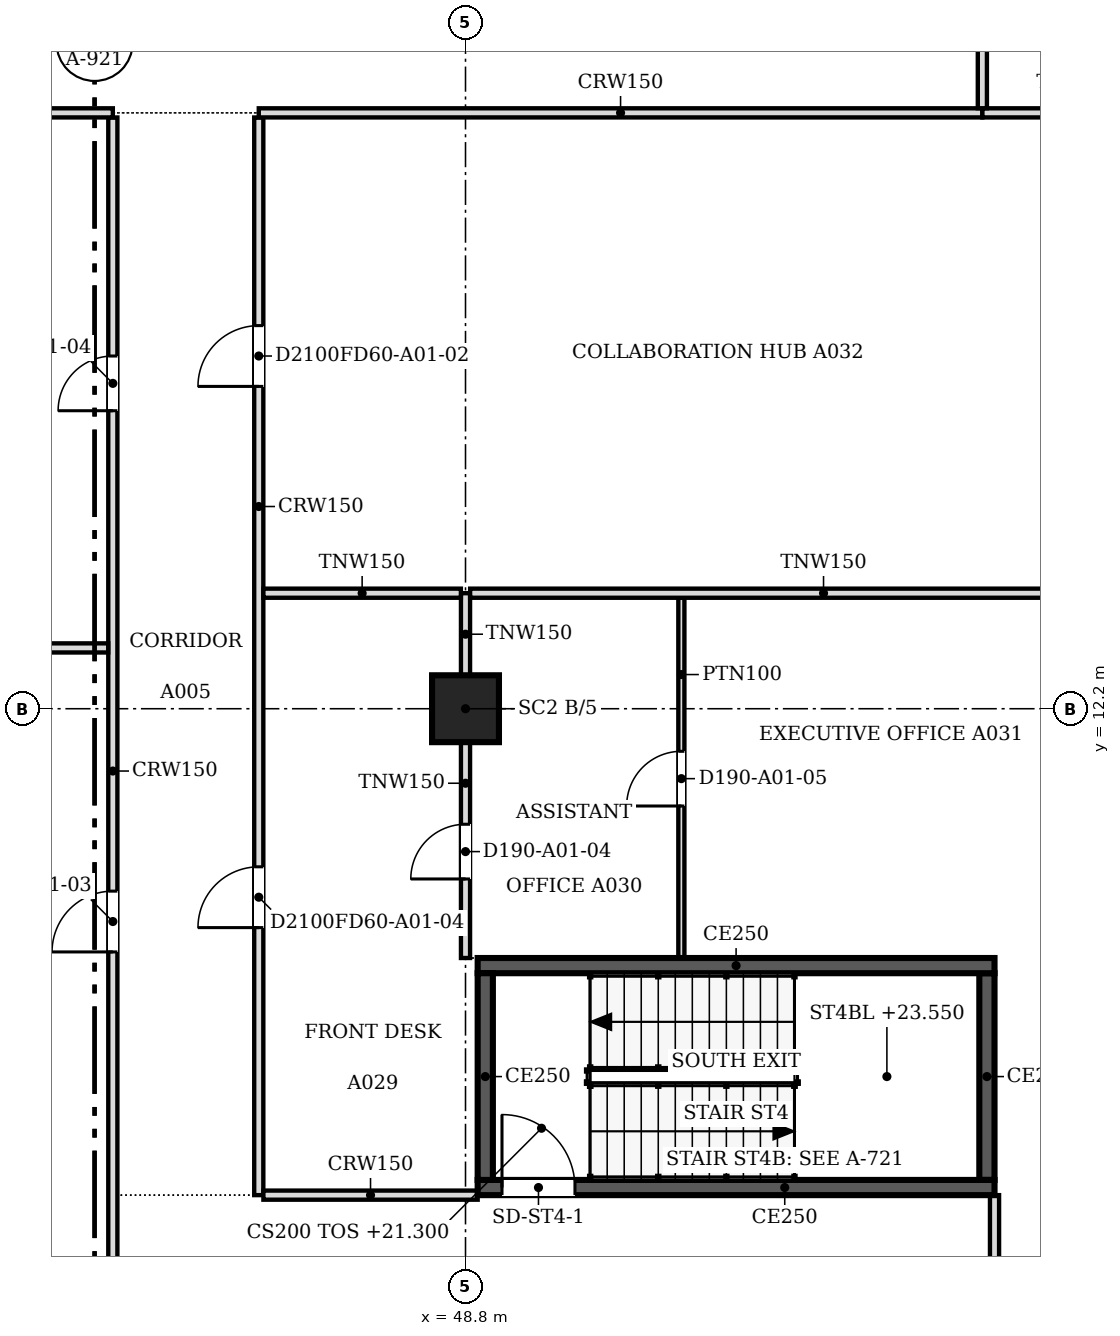
"""IFC4 building model, lengths in metres.
Left out: names, types, materials, properties, quantities, classifications, styles, units other than length and angle.
Written with IfcOpenShell. Run it as: python <this file> out.ifc"""

import sys

from ifc_helpers import new_model, si_unit, direction, frame, frame_2d, origin, origin_2d, place, context, subcontext, project, spatial, polyline, rectangle, outline, extrude, faceted_brep, source, transform, mapped, element, fill, save


model = new_model("IFC4")
c1 = context("Model", 3, precision=1e-05, world=origin(), true_north=direction((0.0, 1.0)))
c2 = subcontext(c1, "Body", "Model", "MODEL_VIEW")
j1 = project(units=[si_unit("LENGTHUNIT", "METRE"), si_unit("PLANEANGLEUNIT", "RADIAN")], contexts=[c1])
p1 = place(None, origin())
s1 = spatial("IfcSite", under=j1, at=p1, CompositionType="ELEMENT")
p2 = place(p1, origin())
s2 = spatial("IfcBuilding", under=s1, at=p2, CompositionType="ELEMENT")
p3 = place(p2, frame((0.0, 0.0, 21.3)))
s3 = spatial("IfcBuildingStorey", under=s2, at=p3, CompositionType="ELEMENT", Elevation=21.3)
p4 = place(p3, frame((48.8, 12.2, 0.0), z_axis=(0.0, 0.0, 1.0), x_axis=(1.0, 0.0, 0.0)))
e1 = element("IfcColumn", 1, at=p4, inside=s3, PredefinedType="COLUMN", context=c2, shape_type="SweptSolid", body=[
    extrude(rectangle(XDim=1.1, YDim=1.1, at=origin_2d()), origin(), (0.0, 0.0, 1.0), 4.3),
])
m1 = source(origin(), c2, "Body", "Brep", [
    faceted_brep([(0.053, -0.25, 0.0), (2.997, -0.25, 4.5), (0.053, -0.25, 9.0), (0.0, -0.25, 8.919), (0.0, -0.25, 0.081), (0.106, 0.25, 8.919), (2.944, 0.25, 4.581), (2.944, 0.25, 4.419), (0.106, 0.25, 0.081), (2.997, 0.0, 4.5), (0.053, 0.0, 0.0), (0.053, 0.0, 9.0)], [[[0, 1, 2, 3, 4]], [[5, 6, 7, 8]], [[8, 7, 9, 1, 0, 10]], [[6, 5, 11, 2, 1, 9]], [[3, 2, 11]], [[10, 0, 4]], [[8, 10, 4, 3, 11, 5]], [[9, 7, 6]]]),
])
p5 = place(p3, frame((57.569, 1.274, -4.5), z_axis=(0.0, 0.0, 1.0), x_axis=(0.707066050402, 0.707147509625, 0.0)))
e2 = element("IfcWall", 2, at=p5, inside=s3, PredefinedType="SOLIDWALL", context=c2, shape_type="MappedRepresentation", body=[
    mapped(m1, transform((0.0, 0.0, 0.0), scale=1.0)),
])
m2 = source(origin(), c2, "Body", "SweptSolid", [
    extrude(outline(polyline([(0.253, 0.762), (2.698, 4.5), (0.253, 8.238), (0.253, 0.762)])), frame((0.0, 0.26, 0.0), z_axis=(0.0, -1.0, 0.0), x_axis=(1.0, 0.0, 0.0)), (0.0, 0.0, 1.0), 0.52),
])
p6 = place(p5, origin())
e3 = element("IfcOpeningElement", 3, at=p6, cuts=e2, PredefinedType="OPENING", context=c2, shape_type="MappedRepresentation", body=[
    mapped(m2, transform((0.0, 0.0, 0.0), scale=1.0)),
])
m3 = source(origin(), c2, "Body", "Brep", [
    faceted_brep([(2.944, -0.25, 0.0), (2.997, -0.25, 0.081), (2.997, -0.25, 4.5), (0.0, -0.25, 4.5), (0.053, 0.25, 4.5), (2.891, 0.25, 4.5), (2.891, 0.25, 0.081), (0.053, 0.25, 4.419), (2.944, 0.0, 0.0), (0.0, 0.0, 4.5)], [[[0, 1, 2, 3]], [[4, 5, 6, 7]], [[1, 0, 8]], [[5, 4, 9, 3, 2]], [[7, 6, 8, 0, 3, 9]], [[7, 9, 4]], [[1, 8, 6, 5, 2]]]),
])
p7 = place(p3, frame((57.606, 1.312, 0.0), z_axis=(0.0, 0.0, 1.0), x_axis=(0.707147509625, 0.707066050402, 0.0)))
e4 = element("IfcWall", 4, at=p7, inside=s3, PredefinedType="SOLIDWALL", context=c2, shape_type="MappedRepresentation", body=[
    mapped(m3, transform((0.0, 0.0, 0.0), scale=1.0)),
])
m4 = source(origin(), c2, "Body", "SweptSolid", [
    extrude(outline(polyline([(2.744, 4.25), (0.462, 4.25), (2.744, 0.762), (2.744, 4.25)])), frame((0.0, 0.26, 0.0), z_axis=(0.0, -1.0, 0.0), x_axis=(1.0, 0.0, 0.0)), (0.0, 0.0, 1.0), 0.52),
])
p8 = place(p7, origin())
e5 = element("IfcOpeningElement", 5, at=p8, cuts=e4, PredefinedType="OPENING", context=c2, shape_type="MappedRepresentation", body=[
    mapped(m4, transform((0.0, 0.0, 0.0), scale=1.0)),
])
p9 = place(p3, frame((57.5, 4.325, 0.0), z_axis=(0.0, 0.0, 1.0), x_axis=(-1.0, 0.0, 0.0)))
e6 = element("IfcWall", 6, at=p9, inside=s3, PredefinedType="SOLIDWALL", context=c2, shape_type="SweptSolid", body=[
    extrude(rectangle(XDim=8.5, YDim=0.25, at=frame_2d((4.25, 0.0))), origin(), (0.0, 0.0, 1.0), 4.5),
])
m5 = source(origin(), c2, "Body", "SweptSolid", [
    extrude(rectangle(XDim=1.2, YDim=2.1, at=frame_2d((0.6, 1.05))), frame((0.0, 0.135, 0.0), z_axis=(0.0, -1.0, 0.0), x_axis=(1.0, 0.0, 0.0)), (0.0, 0.0, 1.0), 0.27),
])
p10 = place(p9, frame((6.9, 0.0, 0.0)))
e7 = element("IfcOpeningElement", 7, at=p10, cuts=e6, PredefinedType="OPENING", context=c2, shape_type="MappedRepresentation", body=[
    mapped(m5, transform((0.0, 0.0, 0.0), scale=1.0)),
])
p11 = place(p3, frame((49.125, 4.45, 0.0), z_axis=(0.0, 0.0, 1.0), x_axis=(0.0, 1.0, 0.0)))
e8 = element("IfcWall", 8, at=p11, inside=s3, PredefinedType="SOLIDWALL", context=c2, shape_type="SweptSolid", body=[
    extrude(rectangle(XDim=3.4, YDim=0.25, at=frame_2d((1.7, 0.0))), origin(), (0.0, 0.0, 1.0), 4.5),
])
p12 = place(p3, frame((49.0, 7.975, 0.0), z_axis=(0.0, 0.0, 1.0), x_axis=(1.0, 0.0, 0.0)))
e9 = element("IfcWall", 9, at=p12, inside=s3, PredefinedType="SOLIDWALL", context=c2, shape_type="SweptSolid", body=[
    extrude(rectangle(XDim=8.5, YDim=0.25, at=frame_2d((4.25, 0.0))), origin(), (0.0, 0.0, 1.0), 4.5),
])
p13 = place(p3, frame((57.375, 7.85, 0.0), z_axis=(0.0, 0.0, 1.0), x_axis=(0.0, -1.0, 0.0)))
e10 = element("IfcWall", 10, at=p13, inside=s3, PredefinedType="SOLIDWALL", context=c2, shape_type="SweptSolid", body=[
    extrude(rectangle(XDim=3.4, YDim=0.25, at=frame_2d((1.7, 0.0))), origin(), (0.0, 0.0, 1.0), 4.5),
])
p14 = place(p3, frame((43.0, 0.5, 0.0), z_axis=(0.0, 0.0, 1.0), x_axis=(0.0, 1.0, 0.0)))
e11 = element("IfcWall", 11, at=p14, inside=s3, PredefinedType="PARTITIONING", context=c2, shape_type="SweptSolid", body=[
    extrude(rectangle(XDim=21.424, YDim=0.15, at=frame_2d((10.712, 0.0))), origin(), (0.0, 0.0, 1.0), 3.767),
])
m6 = source(origin(), c2, "Body", "SweptSolid", [
    extrude(rectangle(XDim=0.9, YDim=2.1, at=frame_2d((0.45, 1.05))), frame((0.0, 0.085, 0.0), z_axis=(0.0, -1.0, 0.0), x_axis=(1.0, 0.0, 0.0)), (0.0, 0.0, 1.0), 0.17),
])
p15 = place(p14, frame((16.601, 0.0, 0.0)))
e12 = element("IfcOpeningElement", 12, at=p15, cuts=e11, PredefinedType="OPENING", context=c2, shape_type="MappedRepresentation", body=[
    mapped(m6, transform((0.0, 0.0, 0.0), scale=1.0)),
])
m7 = source(origin(), c2, "Body", "SweptSolid", [
    extrude(rectangle(XDim=1.0, YDim=2.1, at=frame_2d((0.5, 1.05))), frame((0.0, 0.085, 0.0), z_axis=(0.0, -1.0, 0.0), x_axis=(1.0, 0.0, 0.0)), (0.0, 0.0, 1.0), 0.17),
])
p16 = place(p14, frame((7.7, 0.0, 0.0)))
e13 = element("IfcOpeningElement", 13, at=p16, cuts=e11, PredefinedType="OPENING", context=c2, shape_type="MappedRepresentation", body=[
    mapped(m7, transform((0.0, 0.0, 0.0), scale=1.0)),
])
p17 = place(p3, frame((57.5, 1.559, 0.0), z_axis=(0.0, 0.0, 1.0), x_axis=(0.0, 1.0, 0.0)))
e14 = element("IfcWall", 14, at=p17, inside=s3, PredefinedType="PARTITIONING", context=c2, shape_type="SweptSolid", body=[
    extrude(rectangle(XDim=2.641, YDim=0.15, at=frame_2d((1.32, 0.0))), origin(), (0.0, 0.0, 1.0), 3.767),
])
p18 = place(p3, frame((45.4, 21.924, 0.0), z_axis=(0.0, 0.0, 1.0), x_axis=(0.0, -1.0, 0.0)))
e15 = element("IfcWall", 15, at=p18, inside=s3, PredefinedType="PARTITIONING", context=c2, shape_type="SweptSolid", body=[
    extrude(rectangle(XDim=17.724, YDim=0.15, at=frame_2d((8.862, 0.0))), origin(), (0.0, 0.0, 1.0), 3.767),
])
p19 = place(p18, frame((3.423, 0.0, 0.0)))
e16 = element("IfcOpeningElement", 16, at=p19, cuts=e15, PredefinedType="OPENING", context=c2, shape_type="MappedRepresentation", body=[
    mapped(m7, transform((0.0, 0.0, 0.0), scale=1.0)),
])
p20 = place(p18, frame((12.324, 0.0, 0.0)))
e17 = element("IfcOpeningElement", 17, at=p20, cuts=e15, PredefinedType="OPENING", context=c2, shape_type="MappedRepresentation", body=[
    mapped(m7, transform((0.0, 0.0, 0.0), scale=1.0)),
])
p21 = place(p3, frame((45.476, 4.2, 0.0), z_axis=(0.0, 0.0, 1.0), x_axis=(1.0, 0.0, 0.0)))
e18 = element("IfcWall", 18, at=p21, inside=s3, PredefinedType="PARTITIONING", context=c2, shape_type="SweptSolid", body=[
    extrude(rectangle(XDim=3.524, YDim=0.15, at=frame_2d((1.762, 0.0))), origin(), (0.0, 0.0, 1.0), 3.767),
])
p22 = place(p3, frame((48.8, 11.649, 0.0), z_axis=(0.0, 0.0, 1.0), x_axis=(0.0, -1.0, 0.0)))
e19 = element("IfcWall", 19, at=p22, inside=s3, PredefinedType="PARTITIONING", context=c2, shape_type="SweptSolid", body=[
    extrude(rectangle(XDim=3.549, YDim=0.15, at=frame_2d((1.774, 0.0))), origin(), (0.0, 0.0, 1.0), 3.767),
])
p23 = place(p22, frame((1.349, 0.0, 0.0)))
e20 = element("IfcOpeningElement", 20, at=p23, cuts=e19, PredefinedType="OPENING", context=c2, shape_type="MappedRepresentation", body=[
    mapped(m6, transform((0.0, 0.0, 0.0), scale=1.0)),
])
p24 = place(p3, frame((52.35, 14.024, 0.0), z_axis=(0.0, 0.0, 1.0), x_axis=(0.0, -1.0, 0.0)))
e21 = element("IfcWall", 21, at=p24, inside=s3, PredefinedType="PARTITIONING", context=c2, shape_type="SweptSolid", body=[
    extrude(rectangle(XDim=5.924, YDim=0.1, at=frame_2d((2.962, 0.0))), origin(), (0.0, 0.0, 1.0), 3.767),
])
m8 = source(origin(), c2, "Body", "SweptSolid", [
    extrude(rectangle(XDim=0.9, YDim=2.1, at=frame_2d((0.45, 1.05))), frame((0.0, 0.06, 0.0), z_axis=(0.0, -1.0, 0.0), x_axis=(1.0, 0.0, 0.0)), (0.0, 0.0, 1.0), 0.12),
])
p25 = place(p24, frame((2.524, 0.0, 0.0)))
e22 = element("IfcOpeningElement", 22, at=p25, cuts=e21, PredefinedType="OPENING", context=c2, shape_type="MappedRepresentation", body=[
    mapped(m8, transform((0.0, 0.0, 0.0), scale=1.0)),
])
p26 = place(p3, frame((48.8, 12.751, 0.0), z_axis=(0.0, 0.0, 1.0), x_axis=(0.0, 1.0, 0.0)))
e23 = element("IfcWall", 23, at=p26, inside=s3, PredefinedType="PARTITIONING", context=c2, shape_type="SweptSolid", body=[
    extrude(rectangle(XDim=1.349, YDim=0.15, at=frame_2d((0.675, 0.0))), origin(), (0.0, 0.0, 1.0), 3.767),
])
p27 = place(p3, frame((27.275, 13.2, 0.0), z_axis=(0.0, 0.0, 1.0), x_axis=(1.0, 0.0, 0.0)))
e24 = element("IfcWall", 24, at=p27, inside=s3, PredefinedType="PARTITIONING", context=c2, shape_type="SweptSolid", body=[
    extrude(rectangle(XDim=15.649, YDim=0.15, at=frame_2d((7.825, 0.0))), origin(), (0.0, 0.0, 1.0), 3.767),
])
p28 = place(p3, frame((45.476, 14.1, 0.0), z_axis=(0.0, 0.0, 1.0), x_axis=(1.0, 0.0, 0.0)))
e25 = element("IfcWall", 25, at=p28, inside=s3, PredefinedType="PARTITIONING", context=c2, shape_type="SweptSolid", body=[
    extrude(rectangle(XDim=3.248, YDim=0.15, at=frame_2d((1.624, 0.0))), origin(), (0.0, 0.0, 1.0), 3.767),
])
p29 = place(p3, frame((48.876, 14.1, 0.0), z_axis=(0.0, 0.0, 1.0), x_axis=(1.0, 0.0, 0.0)))
e26 = element("IfcWall", 26, at=p29, inside=s3, PredefinedType="PARTITIONING", context=c2, shape_type="SweptSolid", body=[
    extrude(rectangle(XDim=11.624, YDim=0.15, at=frame_2d((5.812, 0.0))), origin(), (0.0, 0.0, 1.0), 3.767),
])
p30 = place(p3, frame((30.5, 22.0, 0.0), z_axis=(0.0, 0.0, 1.0), x_axis=(1.0, 0.0, 0.0)))
e27 = element("IfcWall", 27, at=p30, inside=s3, PredefinedType="PARTITIONING", context=c2, shape_type="SweptSolid", body=[
    extrude(rectangle(XDim=12.5, YDim=0.15, at=frame_2d((6.25, 0.0))), origin(), (0.0, 0.0, 1.0), 3.767),
])
p31 = place(p3, frame((45.4, 22.0, 0.0), z_axis=(0.0, 0.0, 1.0), x_axis=(1.0, 0.0, 0.0)))
e28 = element("IfcWall", 28, at=p31, inside=s3, PredefinedType="PARTITIONING", context=c2, shape_type="SweptSolid", body=[
    extrude(rectangle(XDim=11.9, YDim=0.15, at=frame_2d((5.95, 0.0))), origin(), (0.0, 0.0, 1.0), 3.767),
])
p32 = place(p3, frame((57.301, 22.0, 0.0), z_axis=(0.0, 0.0, 1.0), x_axis=(1.0, 0.0, 0.0)))
e29 = element("IfcWall", 29, at=p32, inside=s3, PredefinedType="PARTITIONING", context=c2, shape_type="SweptSolid", body=[
    extrude(rectangle(XDim=3.199, YDim=0.15, at=frame_2d((1.6, 0.0))), origin(), (0.0, 0.0, 1.0), 3.767),
])
p33 = place(p3, frame((57.3, 30.6, 0.0), z_axis=(0.0, 0.0, 1.0), x_axis=(0.0, -1.0, 0.0)))
e30 = element("IfcWall", 30, at=p33, inside=s3, PredefinedType="PARTITIONING", context=c2, shape_type="SweptSolid", body=[
    extrude(rectangle(XDim=8.524, YDim=0.15, at=frame_2d((4.262, 0.0))), origin(), (0.0, 0.0, 1.0), 3.767),
])
p34 = place(p33, frame((3.824, 0.0, 0.0)))
e31 = element("IfcOpeningElement", 31, at=p34, cuts=e30, PredefinedType="OPENING", context=c2, shape_type="MappedRepresentation", body=[
    mapped(m6, transform((0.0, 0.0, 0.0), scale=1.0)),
])
m9 = source(origin(), c2, "Body", "SweptSolid", [
    extrude(rectangle(XDim=1.2, YDim=2.1, at=frame_2d((0.6, 1.05))), frame((0.0, 0.025, 0.0), z_axis=(0.0, -1.0, 0.0), x_axis=(1.0, 0.0, 0.0)), (0.0, 0.0, 1.0), 0.05),
])
p35 = place(p10, origin())
e32 = element("IfcDoor", 32, at=p35, inside=s3, OperationType="SINGLE_SWING_RIGHT", PredefinedType="DOOR", context=c2, shape_type="MappedRepresentation", body=[
    mapped(m9, transform((0.0, 0.0, 0.0), scale=1.0)),
])
fill(e7, e32)
m10 = source(origin(), c2, "Body", "SweptSolid", [
    extrude(rectangle(XDim=0.9, YDim=2.1, at=frame_2d((0.45, 1.05))), frame((0.0, 0.025, 0.0), z_axis=(0.0, -1.0, 0.0), x_axis=(1.0, 0.0, 0.0)), (0.0, 0.0, 1.0), 0.05),
])
p36 = place(p23, origin())
e33 = element("IfcDoor", 33, at=p36, inside=s3, OperationType="SINGLE_SWING_RIGHT", PredefinedType="DOOR", context=c2, shape_type="MappedRepresentation", body=[
    mapped(m10, transform((0.0, 0.0, 0.0), scale=1.0)),
])
fill(e20, e33)
p37 = place(p25, origin())
e34 = element("IfcDoor", 34, at=p37, inside=s3, OperationType="SINGLE_SWING_RIGHT", PredefinedType="DOOR", context=c2, shape_type="MappedRepresentation", body=[
    mapped(m10, transform((0.0, 0.0, 0.0), scale=1.0)),
])
fill(e22, e34)
m11 = source(origin(), c2, "Body", "SweptSolid", [
    extrude(rectangle(XDim=1.0, YDim=2.1, at=frame_2d((0.5, 1.05))), frame((0.0, 0.025, 0.0), z_axis=(0.0, -1.0, 0.0), x_axis=(1.0, 0.0, 0.0)), (0.0, 0.0, 1.0), 0.05),
])
p38 = place(p19, origin())
e35 = element("IfcDoor", 35, at=p38, inside=s3, OperationType="SINGLE_SWING_RIGHT", PredefinedType="DOOR", context=c2, shape_type="MappedRepresentation", body=[
    mapped(m11, transform((0.0, 0.0, 0.0), scale=1.0)),
])
fill(e16, e35)
p39 = place(p15, origin())
e36 = element("IfcDoor", 36, at=p39, inside=s3, OperationType="SINGLE_SWING_LEFT", PredefinedType="DOOR", context=c2, shape_type="MappedRepresentation", body=[
    mapped(m10, transform((0.0, 0.0, 0.0), scale=1.0)),
])
fill(e12, e36)
p40 = place(p16, origin())
e37 = element("IfcDoor", 37, at=p40, inside=s3, OperationType="SINGLE_SWING_LEFT", PredefinedType="DOOR", context=c2, shape_type="MappedRepresentation", body=[
    mapped(m11, transform((0.0, 0.0, 0.0), scale=1.0)),
])
fill(e13, e37)
p41 = place(p20, origin())
e38 = element("IfcDoor", 38, at=p41, inside=s3, OperationType="SINGLE_SWING_RIGHT", PredefinedType="DOOR", context=c2, shape_type="MappedRepresentation", body=[
    mapped(m11, transform((0.0, 0.0, 0.0), scale=1.0)),
])
fill(e17, e38)
save(model, sys.argv[1])
